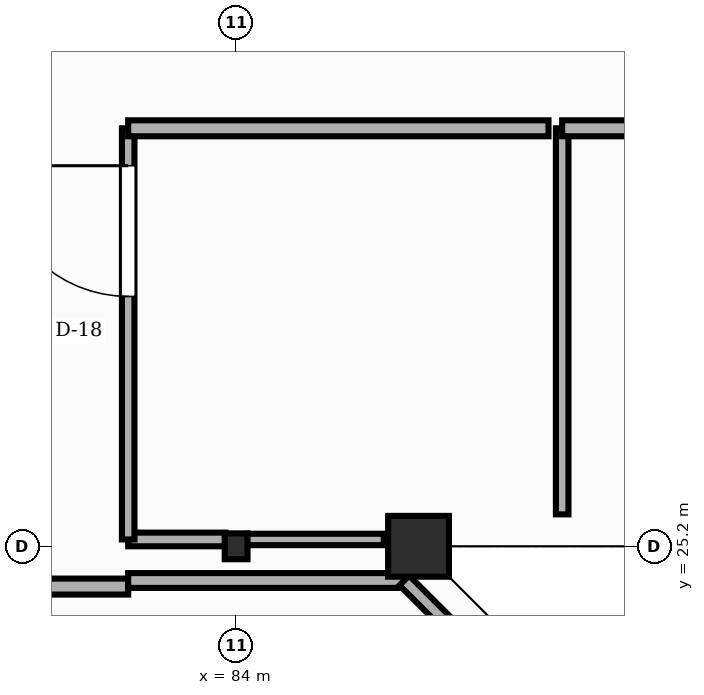
"""IFC4 building model, lengths in metres.
Left out: names, types, materials, properties, quantities, classifications, styles, units other than length and angle.
Written with IfcOpenShell. Run it as: python <this file> out.ifc"""

import sys

from ifc_helpers import new_model, si_unit, direction, frame, frame_2d, origin, origin_2d, place, context, subcontext, project, spatial, rectangle, i_section, extrude, element, fill, save


model = new_model("IFC4")
c1 = context("Model", 3, precision=1e-05, world=origin(), true_north=direction((0.0, 1.0)))
c2 = subcontext(c1, "Body", "Model", "MODEL_VIEW")
j1 = project(units=[si_unit("LENGTHUNIT", "METRE"), si_unit("PLANEANGLEUNIT", "RADIAN")], contexts=[c1])
p1 = place(None, origin())
s1 = spatial("IfcSite", under=j1, at=p1, CompositionType="ELEMENT")
p2 = place(p1, origin())
s2 = spatial("IfcBuilding", under=s1, at=p2, CompositionType="ELEMENT")
p3 = place(p2, frame((0.0, 0.0, 5.4)))
s3 = spatial("IfcBuildingStorey", under=s2, at=p3, CompositionType="ELEMENT", Elevation=5.4)
p4 = place(p3, frame((84.0, 25.2, 0.0), z_axis=(0.0, 0.0, 1.0), x_axis=(1.0, 0.0, 0.0)))
e1 = element("IfcColumn", 1, at=p4, inside=s3, PredefinedType="COLUMN", context=c2, shape_type="SweptSolid", body=[
    extrude(i_section(OverallWidth=0.3, OverallDepth=0.34, WebThickness=0.012, FlangeThickness=0.021, FilletRadius=0.027, at=origin_2d()), origin(), (0.0, 0.0, 1.0), 4.5),
])
p5 = place(p3, frame((86.4, 25.2, 0.0), z_axis=(0.0, 0.0, 1.0), x_axis=(1.0, 0.0, 0.0)))
e2 = element("IfcColumn", 2, at=p5, inside=s3, PredefinedType="COLUMN", context=c2, shape_type="SweptSolid", body=[
    extrude(rectangle(XDim=0.8, YDim=0.8, at=origin_2d()), origin(), (0.0, 0.0, 1.0), 4.5),
])
p6 = place(p3, frame((79.42, 24.67, -0.004), z_axis=(0.0, 0.0, 1.0), x_axis=(1.0, 0.0, 0.0)))
e3 = element("IfcWall", 3, at=p6, inside=s3, PredefinedType="STANDARD", context=c2, shape_type="SweptSolid", body=[
    extrude(rectangle(XDim=3.16, YDim=0.21, at=frame_2d((1.58, 0.0))), origin(), (0.0, 0.0, 1.0), 3.386),
])
p7 = place(p6, frame((0.36, 0.0, 0.0)))
e4 = element("IfcOpeningElement", 4, at=p7, cuts=e3, PredefinedType="OPENING", context=c2, shape_type="SweptSolid", body=[
    extrude(rectangle(XDim=1.54, YDim=2.22, at=frame_2d((0.77, 1.11))), frame((0.0, 0.115, 0.0), z_axis=(0.0, -1.0, 0.0), x_axis=(1.0, 0.0, 0.0)), (0.0, 0.0, 1.0), 0.23),
])
p8 = place(p3, frame((82.58, 24.75, -0.004), z_axis=(0.0, 0.0, 1.0), x_axis=(1.0, 0.0, 0.0)))
e5 = element("IfcWall", 5, at=p8, inside=s3, PredefinedType="STANDARD", context=c2, shape_type="SweptSolid", body=[
    extrude(rectangle(XDim=3.634, YDim=0.195, at=frame_2d((1.817, 0.0))), origin(), (0.0, 0.0, 1.0), 3.386),
])
p9 = place(p3, frame((86.214, 24.75, -0.004), z_axis=(0.0, 0.0, 1.0), x_axis=(0.707106781187, -0.707106781187, 0.0)))
e6 = element("IfcWall", 6, at=p9, inside=s3, PredefinedType="STANDARD", context=c2, shape_type="SweptSolid", body=[
    extrude(rectangle(XDim=8.112, YDim=0.18, at=frame_2d((4.056, 0.0))), origin(), (0.0, 0.0, 1.0), 3.386),
])
p10 = place(p3, frame((88.29, 25.62, -0.004), z_axis=(0.0, 0.0, 1.0), x_axis=(0.0, 1.0, 0.0)))
e7 = element("IfcWall", 7, at=p10, inside=s3, PredefinedType="STANDARD", context=c2, shape_type="SweptSolid", body=[
    extrude(rectangle(XDim=5.08, YDim=0.165, at=frame_2d((2.54, 0.0))), origin(), (0.0, 0.0, 1.0), 4.294),
])
p11 = place(p3, frame((88.29, 30.7, -0.004), z_axis=(0.0, 0.0, 1.0), x_axis=(1.0, 0.0, 0.0)))
e8 = element("IfcWall", 8, at=p11, inside=s3, PredefinedType="STANDARD", context=c2, shape_type="SweptSolid", body=[
    extrude(rectangle(XDim=12.42, YDim=0.21, at=frame_2d((6.21, 0.0))), origin(), (0.0, 0.0, 1.0), 3.986),
])
p12 = place(p11, frame((7.483, 0.0, 0.0)))
e9 = element("IfcOpeningElement", 9, at=p12, cuts=e8, PredefinedType="OPENING", context=c2, shape_type="SweptSolid", body=[
    extrude(rectangle(XDim=1.18, YDim=2.06, at=frame_2d((0.59, 1.03))), frame((0.0, 0.115, 0.0), z_axis=(0.0, -1.0, 0.0), x_axis=(1.0, 0.0, 0.0)), (0.0, 0.0, 1.0), 0.23),
])
p13 = place(p3, frame((85.942, 25.29, -0.004), z_axis=(0.0, 0.0, 1.0), x_axis=(-1.0, 0.0, 0.0)))
e10 = element("IfcWall", 10, at=p13, inside=s3, PredefinedType="STANDARD", context=c2, shape_type="SweptSolid", body=[
    extrude(rectangle(XDim=1.803, YDim=0.15, at=frame_2d((0.901, 0.0))), origin(), (0.0, 0.0, 1.0), 3.386),
])
p14 = place(p3, frame((83.861, 25.29, -0.004), z_axis=(0.0, 0.0, 1.0), x_axis=(-1.0, 0.0, 0.0)))
e11 = element("IfcWall", 11, at=p14, inside=s3, PredefinedType="STANDARD", context=c2, shape_type="SweptSolid", body=[
    extrude(rectangle(XDim=1.281, YDim=0.18, at=frame_2d((0.64, 0.0))), origin(), (0.0, 0.0, 1.0), 3.386),
])
p15 = place(p3, frame((82.58, 25.29, -0.004), z_axis=(0.0, 0.0, 1.0), x_axis=(0.0, 1.0, 0.0)))
e12 = element("IfcWall", 12, at=p15, inside=s3, PredefinedType="STANDARD", context=c2, shape_type="SweptSolid", body=[
    extrude(rectangle(XDim=5.41, YDim=0.165, at=frame_2d((2.705, 0.0))), origin(), (0.0, 0.0, 1.0), 4.294),
])
p16 = place(p15, frame((3.198, 0.0, 0.0)))
e13 = element("IfcOpeningElement", 13, at=p16, cuts=e12, PredefinedType="OPENING", context=c2, shape_type="SweptSolid", body=[
    extrude(rectangle(XDim=1.72, YDim=2.14, at=frame_2d((0.86, 1.07))), frame((0.0, 0.093, 0.0), z_axis=(0.0, -1.0, 0.0), x_axis=(1.0, 0.0, 0.0)), (0.0, 0.0, 1.0), 0.185),
])
p17 = place(p3, frame((82.58, 30.7, -0.004), z_axis=(0.0, 0.0, 1.0), x_axis=(1.0, 0.0, 0.0)))
e14 = element("IfcWall", 14, at=p17, inside=s3, PredefinedType="STANDARD", context=c2, shape_type="SweptSolid", body=[
    extrude(rectangle(XDim=5.53, YDim=0.21, at=frame_2d((2.765, 0.0))), origin(), (0.0, 0.0, 1.0), 3.986),
])
p18 = place(p16, origin())
e15 = element("IfcDoor", 15, at=p18, inside=s3, OperationType="SINGLE_SWING_RIGHT", PredefinedType="DOOR", context=c2, shape_type="SweptSolid", body=[
    extrude(rectangle(XDim=1.72, YDim=2.14, at=frame_2d((0.86, 1.07))), frame((0.0, 0.025, 0.0), z_axis=(0.0, -1.0, 0.0), x_axis=(1.0, 0.0, 0.0)), (0.0, 0.0, 1.0), 0.05),
])
fill(e13, e15)
save(model, sys.argv[1])
